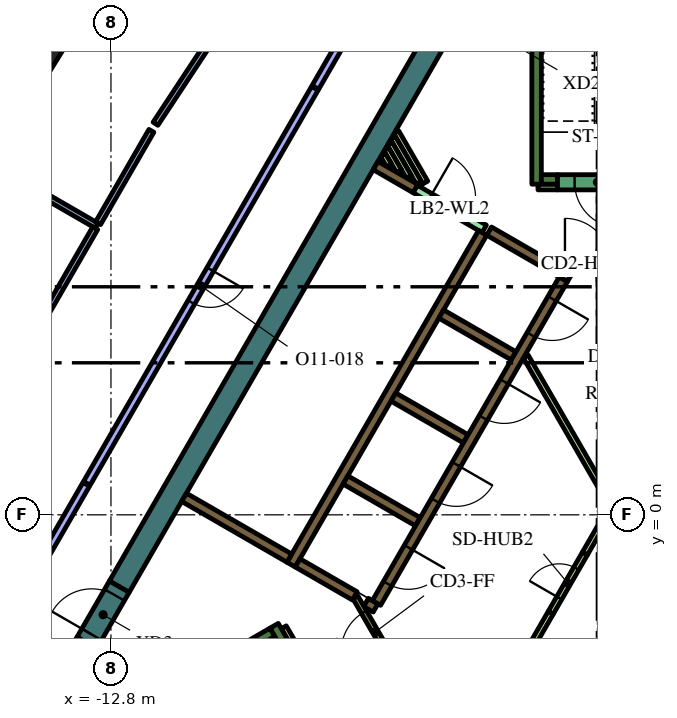
"""IFC4 building model, lengths in metres.
Left out: names, types, materials, properties, quantities, classifications, styles, units other than length and angle.
Written with IfcOpenShell. Run it as: python <this file> out.ifc"""

import sys

from ifc_helpers import new_model, si_unit, direction, frame, frame_2d, origin, origin_2d, place, context, subcontext, project, spatial, polyline, rectangle, outline, extrude, element, fill, save


model = new_model("IFC4")
c1 = context("Model", 3, precision=1e-05, world=origin(), true_north=direction((0.0, 1.0)))
c2 = subcontext(c1, "Body", "Model", "MODEL_VIEW")
j1 = project(units=[si_unit("LENGTHUNIT", "METRE"), si_unit("PLANEANGLEUNIT", "RADIAN")], contexts=[c1])
p1 = place(None, origin())
s1 = spatial("IfcSite", under=j1, at=p1, CompositionType="ELEMENT")
p2 = place(p1, origin())
s2 = spatial("IfcBuilding", under=s1, at=p2, CompositionType="ELEMENT")
p3 = place(p2, frame((0.0, 0.0, 271.2)))
s3 = spatial("IfcBuildingStorey", under=s2, at=p3, CompositionType="ELEMENT", Elevation=271.2)
p4 = place(p3, frame((-14.556, 12.098, 0.0), z_axis=(0.0, 0.0, 1.0), x_axis=(-0.525609744083, -0.850725805959, 0.0)))
e1 = element("IfcColumn", 1, at=p4, inside=s3, PredefinedType="COLUMN", context=c2, shape_type="SweptSolid", body=[
    extrude(rectangle(XDim=1.0, YDim=0.7, at=origin_2d()), origin(), (0.0, 0.0, 1.0), 4.2),
])
p5 = place(p3, frame((-13.432, -3.364, 0.0), z_axis=(0.0, 0.0, 1.0), x_axis=(-0.499960127962, -0.866048422692, 0.0)))
e2 = element("IfcWall", 2, at=p5, inside=s3, PredefinedType="SOLIDWALL", context=c2, shape_type="SweptSolid", body=[
    extrude(rectangle(XDim=2.934, YDim=0.6, at=frame_2d((1.467, 0.0))), origin(), (0.0, 0.0, 1.0), 4.2),
])
p6 = place(p3, frame((-4.234, 12.566, 0.0), z_axis=(0.0, 0.0, 1.0), x_axis=(-0.499998841866, -0.866026072432, 0.0)))
e3 = element("IfcWall", 3, at=p6, inside=s3, PredefinedType="SOLIDWALL", context=c2, shape_type="SweptSolid", body=[
    extrude(rectangle(XDim=16.694, YDim=0.6, at=frame_2d((8.347, 0.0))), origin(), (0.0, 0.0, 1.0), 4.2),
])
p7 = place(p3, frame((-1.6, 8.7, 0.0), z_axis=(0.0, 0.0, 1.0), x_axis=(0.0, 1.0, 0.0)))
e4 = element("IfcWall", 4, at=p7, inside=s3, PredefinedType="SOLIDWALL", context=c2, shape_type="SweptSolid", body=[
    extrude(rectangle(XDim=7.05, YDim=0.25, at=frame_2d((3.525, 0.0))), origin(), (0.0, 0.0, 1.0), 4.2),
])
p8 = place(p3, frame((-1.475, 8.825, 0.0), z_axis=(0.0, 0.0, 1.0), x_axis=(1.0, 0.0, 0.0)))
e5 = element("IfcWall", 5, at=p8, inside=s3, PredefinedType="SOLIDWALL", context=c2, shape_type="SweptSolid", body=[
    extrude(rectangle(XDim=0.425, YDim=0.25, at=frame_2d((0.212, 0.0))), origin(), (0.0, 0.0, 1.0), 4.2),
])
p9 = place(p3, frame((-14.44, -6.49, 0.0), z_axis=(0.0, 0.0, 1.0), x_axis=(0.866022966069, 0.500004222222, 0.0)))
e6 = element("IfcWall", 6, at=p9, inside=s3, PredefinedType="SOLIDWALL", context=c2, shape_type="SweptSolid", body=[
    extrude(rectangle(XDim=6.8, YDim=0.25, at=frame_2d((3.4, 0.0))), origin(), (0.0, 0.0, 1.0), 4.2),
])
p10 = place(p3, frame((-8.168, -3.503, 0.0), z_axis=(0.0, 0.0, 1.0), x_axis=(-0.499952099219, 0.866053057547, 0.0)))
e7 = element("IfcWall", 7, at=p10, inside=s3, PredefinedType="SOLIDWALL", context=c2, shape_type="SweptSolid", body=[
    extrude(rectangle(XDim=0.675, YDim=0.25, at=frame_2d((0.337, 0.0))), origin(), (0.0, 0.0, 1.0), 4.2),
])
p11 = place(p3, frame((-3.02, 7.419, 0.0), z_axis=(0.0, 0.0, 1.0), x_axis=(-0.500022956343, -0.866012149528, 0.0)))
e8 = element("IfcWall", 8, at=p11, inside=s3, PredefinedType="SOLIDWALL", context=c2, shape_type="SweptSolid", body=[
    extrude(rectangle(XDim=10.08, YDim=0.25, at=frame_2d((5.04, 0.0))), origin(), (0.0, 0.0, 1.0), 4.2),
])
p12 = place(p3, origin())
e9 = element("IfcWall", 9, at=p12, inside=s3, PredefinedType="SOLIDWALL", context=c2, shape_type="SweptSolid", body=[
    extrude(outline(polyline([(-2.912, 7.356), (-2.787, 7.573), (-1.232, 6.675), (-1.303, 6.675), (-1.304, 6.675), (-1.304, 6.675), (-1.304, 6.525), (-1.304, 6.525), (-1.303, 6.525), (-0.971, 6.525), (-0.665, 6.348), (-0.79, 6.132), (-1.007, 6.257), (-1.007, 6.257), (-2.912, 7.356)])), origin(), (0.0, 0.0, 1.0), 4.2),
])
for number, where, z_axis, x_axis in (
    (10, (-2.204, 4.182, 0.0), (0.0, 0.0, 1.0), (-0.866, 0.5, 0.0)),
    (11, (-5.369, 3.1, 0.0), (0.0, 0.0, 1.0), (0.866, -0.5, 0.0)),
    (12, (-4.724, -0.182, 0.0), (0.0, 0.0, 1.0), (-0.866, 0.5, 0.0)),
):
    element("IfcWall", number, at=place(p3, frame(where, z_axis=z_axis, x_axis=x_axis)), inside=s3, PredefinedType="SOLIDWALL", context=c2, shape_type="SweptSolid", body=[
        extrude(rectangle(XDim=2.2, YDim=0.25, at=frame_2d((1.1, 0.0))), origin(), (0.0, 0.0, 1.0), 4.2),
    ])
p13 = place(p3, frame((-6.088, -2.305, 0.0), z_axis=(0.0, 0.0, 1.0), x_axis=(0.866059450854, -0.499941024108, 0.0)))
e13 = element("IfcWall", 13, at=p13, inside=s3, PredefinedType="SOLIDWALL", context=c2, shape_type="SweptSolid", body=[
    extrude(rectangle(XDim=0.29, YDim=0.25, at=frame_2d((0.145, 0.0))), origin(), (0.0, 0.0, 1.0), 4.2),
])
p14 = place(p3, frame((-7.889, -1.265, 0.0), z_axis=(0.0, 0.0, 1.0), x_axis=(0.865986741702, -0.500066958712, 0.0)))
e14 = element("IfcWall", 14, at=p14, inside=s3, PredefinedType="SOLIDWALL", context=c2, shape_type="SweptSolid", body=[
    extrude(rectangle(XDim=1.738, YDim=0.25, at=frame_2d((0.869, 0.0))), origin(), (0.0, 0.0, 1.0), 4.2),
])
p15 = place(p3, frame((-8.106, -1.14, 0.0), z_axis=(0.0, 0.0, 1.0), x_axis=(-0.866008981251, 0.500028443584, 0.0)))
e15 = element("IfcWall", 15, at=p15, inside=s3, PredefinedType="SOLIDWALL", context=c2, shape_type="SweptSolid", body=[
    extrude(rectangle(XDim=3.2, YDim=0.25, at=frame_2d((1.6, 0.0))), origin(), (0.0, 0.0, 1.0), 4.2),
])
p16 = place(p3, frame((-5.837, 9.19, 0.0), z_axis=(0.0, 0.0, 1.0), x_axis=(0.866024298998, -0.500001913541, 0.0)))
e16 = element("IfcWall", 16, at=p16, inside=s3, PredefinedType="SOLIDWALL", context=c2, shape_type="SweptSolid", body=[
    extrude(rectangle(XDim=1.21, YDim=0.25, at=frame_2d((0.605, 0.0))), origin(), (0.0, 0.0, 1.0), 4.2),
])
p17 = place(p3, frame((-8.252, -2.958, 0.0), z_axis=(0.0, 0.0, 1.0), x_axis=(0.500174715838, -0.865924508047, 0.0)))
e17 = element("IfcWall", 17, at=p17, inside=s3, PredefinedType="PARTITIONING", context=c2, shape_type="SweptSolid", body=[
    extrude(rectangle(XDim=0.514, YDim=0.15, at=frame_2d((0.257, 0.0))), origin(), (0.0, 0.0, 1.0), 3.55),
])
p18 = place(p3, frame((-5.294, 10.067, 0.0), z_axis=(0.0, 0.0, 1.0), x_axis=(0.500054140411, -0.865994143547, 0.0)))
e18 = element("IfcWall", 18, at=p18, inside=s3, PredefinedType="PARTITIONING", context=c2, shape_type="SweptSolid", body=[
    extrude(rectangle(XDim=1.529, YDim=0.15, at=frame_2d((0.765, 0.0))), origin(), (0.0, 0.0, 1.0), 3.55),
])
p19 = place(p3, frame((-5.381, 9.917, 0.0), z_axis=(0.0, 0.0, 1.0), x_axis=(0.500136970483, -0.865946309396, 0.0)))
e19 = element("IfcWall", 19, at=p19, inside=s3, PredefinedType="PARTITIONING", context=c2, shape_type="SweptSolid", body=[
    extrude(rectangle(XDim=1.359, YDim=0.15, at=frame_2d((0.68, 0.0))), origin(), (0.0, 0.0, 1.0), 3.55),
])
p20 = place(p3, frame((-5.467, 9.767, 0.0), z_axis=(0.0, 0.0, 1.0), x_axis=(0.500168849293, -0.86592789665, 0.0)))
e20 = element("IfcWall", 20, at=p20, inside=s3, PredefinedType="PARTITIONING", context=c2, shape_type="SweptSolid", body=[
    extrude(rectangle(XDim=1.01, YDim=0.15, at=frame_2d((0.505, 0.0))), origin(), (0.0, 0.0, 1.0), 3.55),
])
p21 = place(p3, frame((-5.554, 9.617, 0.0), z_axis=(0.0, 0.0, 1.0), x_axis=(0.500253084543, -0.86587923604, 0.0)))
e21 = element("IfcWall", 21, at=p21, inside=s3, PredefinedType="PARTITIONING", context=c2, shape_type="SweptSolid", body=[
    extrude(rectangle(XDim=0.664, YDim=0.15, at=frame_2d((0.332, 0.0))), origin(), (0.0, 0.0, 1.0), 3.55),
])
p22 = place(p3, frame((-5.64, 9.467, 0.0), z_axis=(0.0, 0.0, 1.0), x_axis=(0.499944387978, -0.86605750902, 0.0)))
e22 = element("IfcWall", 22, at=p22, inside=s3, PredefinedType="PARTITIONING", context=c2, shape_type="SweptSolid", body=[
    extrude(rectangle(XDim=0.317, YDim=0.15, at=frame_2d((0.159, 0.0))), origin(), (0.0, 0.0, 1.0), 3.55),
])
p23 = place(p3, frame((-1.564, 8.625, 0.0), z_axis=(0.0, 0.0, 1.0), x_axis=(1.0, 0.0, 0.0)))
e23 = element("IfcWall", 23, at=p23, inside=s3, PredefinedType="PARTITIONING", context=c2, shape_type="SweptSolid", body=[
    extrude(rectangle(XDim=0.514, YDim=0.15, at=frame_2d((0.257, 0.0))), origin(), (0.0, 0.0, 1.0), 3.55),
])
p24 = place(p3, frame((-1.887, 4.168, 0.0), z_axis=(0.0, 0.0, 1.0), x_axis=(0.499997069472, -0.866027095719, 0.0)))
e24 = element("IfcWall", 24, at=p24, inside=s3, PredefinedType="PARTITIONING", context=c2, shape_type="SweptSolid", body=[
    extrude(rectangle(XDim=9.106, YDim=0.15, at=frame_2d((4.553, 0.0))), origin(), (0.0, 0.0, 1.0), 3.55),
])
for number, where, z_axis, x_axis in (
    (25, (-0.329, -1.021, 0.0), (0.0, 0.0, 1.0), (0.5, 0.866, 0.0)),
    (26, (-1.887, -3.718, 0.0), (0.0, 0.0, 1.0), (0.5, 0.866, 0.0)),
):
    element("IfcWall", number, at=place(p3, frame(where, z_axis=z_axis, x_axis=x_axis)), inside=s3, PredefinedType="PARTITIONING", context=c2, shape_type="SweptSolid", body=[
        extrude(rectangle(XDim=1.315, YDim=0.15, at=frame_2d((0.657, 0.0))), origin(), (0.0, 0.0, 1.0), 3.55),
    ])
p25 = place(p3, frame((-0.898, 6.194, 0.0), z_axis=(0.0, 0.0, 1.0), x_axis=(-0.499996202215, -0.866027596426, 0.0)))
e27 = element("IfcWall", 27, at=p25, inside=s3, PredefinedType="SOLIDWALL", context=c2, shape_type="SweptSolid", body=[
    extrude(rectangle(XDim=9.83, YDim=0.25, at=frame_2d((4.915, 0.0))), origin(), (0.0, 0.0, 1.0), 4.2),
])
p26 = place(p25, frame((0.585, 0.0, 0.0)))
e28 = element("IfcOpeningElement", 28, at=p26, cuts=e27, PredefinedType="OPENING", context=c2, shape_type="SweptSolid", body=[
    extrude(rectangle(XDim=1.1, YDim=2.1, at=frame_2d((0.55, 1.05))), frame((0.0, 0.135, 0.0), z_axis=(0.0, -1.0, 0.0), x_axis=(1.0, 0.0, 0.0)), (0.0, 0.0, 1.0), 0.27),
])
p27 = place(p25, frame((3.105, 0.0, 0.0)))
e29 = element("IfcOpeningElement", 29, at=p27, cuts=e27, PredefinedType="OPENING", context=c2, shape_type="SweptSolid", body=[
    extrude(rectangle(XDim=1.1, YDim=2.1, at=frame_2d((0.55, 1.05))), frame((0.0, 0.135, 0.0), z_axis=(0.0, -1.0, 0.0), x_axis=(1.0, 0.0, 0.0)), (0.0, 0.0, 1.0), 0.27),
])
p28 = place(p25, frame((5.625, 0.0, 0.0)))
e30 = element("IfcOpeningElement", 30, at=p28, cuts=e27, PredefinedType="OPENING", context=c2, shape_type="SweptSolid", body=[
    extrude(rectangle(XDim=1.1, YDim=2.1, at=frame_2d((0.55, 1.05))), frame((0.0, 0.135, 0.0), z_axis=(0.0, -1.0, 0.0), x_axis=(1.0, 0.0, 0.0)), (0.0, 0.0, 1.0), 0.27),
])
p29 = place(p25, frame((8.145, 0.0, 0.0)))
e31 = element("IfcOpeningElement", 31, at=p29, cuts=e27, PredefinedType="OPENING", context=c2, shape_type="SweptSolid", body=[
    extrude(rectangle(XDim=1.1, YDim=2.1, at=frame_2d((0.55, 1.05))), frame((0.0, 0.135, 0.0), z_axis=(0.0, -1.0, 0.0), x_axis=(1.0, 0.0, 0.0)), (0.0, 0.0, 1.0), 0.27),
])
p30 = place(p3, frame((1.05, 8.75, 0.0), z_axis=(0.0, 0.0, 1.0), x_axis=(-1.0, 0.0, 0.0)))
e32 = element("IfcWall", 32, at=p30, inside=s3, PredefinedType="SOLIDWALL", context=c2, shape_type="SweptSolid", body=[
    extrude(rectangle(XDim=2.1, YDim=0.4, at=frame_2d((1.05, 0.0))), origin(), (0.0, 0.0, 1.0), 4.2),
])
p31 = place(p30, frame((0.45, 0.0, 0.0)))
e33 = element("IfcOpeningElement", 33, at=p31, cuts=e32, PredefinedType="OPENING", context=c2, shape_type="SweptSolid", body=[
    extrude(rectangle(XDim=1.2, YDim=2.1, at=frame_2d((0.6, 1.05))), frame((0.0, 0.21, 0.0), z_axis=(0.0, -1.0, 0.0), x_axis=(1.0, 0.0, 0.0)), (0.0, 0.0, 1.0), 0.42),
])
p32 = place(p3, frame((-1.303, 6.6, 0.0), z_axis=(0.0, 0.0, 1.0), x_axis=(1.0, 0.0, 0.0)))
e34 = element("IfcWall", 34, at=p32, inside=s3, PredefinedType="PARTITIONING", context=c2, shape_type="SweptSolid", body=[
    extrude(rectangle(XDim=2.1, YDim=0.15, at=frame_2d((1.05, 0.0))), origin(), (0.0, 0.0, 1.0), 4.2),
])
p33 = place(p32, frame((0.45, 0.0, 0.0)))
e35 = element("IfcOpeningElement", 35, at=p33, cuts=e34, PredefinedType="OPENING", context=c2, shape_type="SweptSolid", body=[
    extrude(rectangle(XDim=1.2, YDim=2.1, at=frame_2d((0.6, 1.05))), frame((0.0, 0.085, 0.0), z_axis=(0.0, -1.0, 0.0), x_axis=(1.0, 0.0, 0.0)), (0.0, 0.0, 1.0), 0.17),
])
p34 = place(p3, frame((-5.317, -3.99, 0.0), z_axis=(0.0, 0.0, 1.0), x_axis=(-0.500027713859, 0.866009402589, 0.0)))
e36 = element("IfcWall", 36, at=p34, inside=s3, PredefinedType="PARTITIONING", context=c2, shape_type="SweptSolid", body=[
    extrude(rectangle(XDim=2.1, YDim=0.15, at=frame_2d((1.05, 0.0))), origin(), (0.0, 0.0, 1.0), 4.2),
])
p35 = place(p34, frame((0.45, 0.0, 0.0)))
e37 = element("IfcOpeningElement", 37, at=p35, cuts=e36, PredefinedType="OPENING", context=c2, shape_type="SweptSolid", body=[
    extrude(rectangle(XDim=1.2, YDim=2.1, at=frame_2d((0.6, 1.05))), frame((0.0, 0.085, 0.0), z_axis=(0.0, -1.0, 0.0), x_axis=(1.0, 0.0, 0.0)), (0.0, 0.0, 1.0), 0.17),
])
p36 = place(p3, frame((-4.796, 8.575, 0.0), z_axis=(0.0, 0.0, 1.0), x_axis=(0.866009402589, -0.500027713859, 0.0)))
e38 = element("IfcWall", 38, at=p36, inside=s3, PredefinedType="PARTITIONING", context=c2, shape_type="SweptSolid", body=[
    extrude(rectangle(XDim=2.1, YDim=0.226, at=frame_2d((1.05, 0.0))), origin(), (0.0, 0.0, 1.0), 3.55),
])
p37 = place(p36, frame((0.45, 0.0, 0.0)))
e39 = element("IfcOpeningElement", 39, at=p37, cuts=e38, PredefinedType="OPENING", context=c2, shape_type="SweptSolid", body=[
    extrude(rectangle(XDim=1.2, YDim=2.1, at=frame_2d((0.6, 1.05))), frame((0.0, 0.123, 0.0), z_axis=(0.0, -1.0, 0.0), x_axis=(1.0, 0.0, 0.0)), (0.0, 0.0, 1.0), 0.246),
])
p38 = place(p3, frame((-13.432, -3.364, 0.0), z_axis=(0.0, 0.0, 1.0), x_axis=(0.500000056704, 0.866025371046, 0.0)))
e40 = element("IfcWall", 40, at=p38, inside=s3, PredefinedType="SOLIDWALL", context=c2, shape_type="SweptSolid", body=[
    extrude(rectangle(XDim=1.7, YDim=0.6, at=frame_2d((0.85, 0.0))), origin(), (0.0, 0.0, 1.0), 4.2),
])
p39 = place(p38, frame((0.25, 0.0, 0.0)))
e41 = element("IfcOpeningElement", 41, at=p39, cuts=e40, PredefinedType="OPENING", context=c2, shape_type="SweptSolid", body=[
    extrude(rectangle(XDim=1.2, YDim=2.1, at=frame_2d((0.6, 1.05))), frame((0.0, 0.31, 0.0), z_axis=(0.0, -1.0, 0.0), x_axis=(1.0, 0.0, 0.0)), (0.0, 0.0, 1.0), 0.62),
])
p40 = place(p3, frame((-1.229, -2.579, 0.0), z_axis=(0.0, 0.0, 1.0), x_axis=(0.500062916607, 0.865989075817, 0.0)))
e42 = element("IfcWall", 42, at=p40, inside=s3, PredefinedType="PARTITIONING", context=c2, shape_type="SweptSolid", body=[
    extrude(rectangle(XDim=1.8, YDim=0.15, at=frame_2d((0.9, 0.0))), origin(), (0.0, 0.0, 1.0), 3.55),
])
p41 = place(p40, frame((0.45, 0.0, 0.0)))
e43 = element("IfcOpeningElement", 43, at=p41, cuts=e42, PredefinedType="OPENING", context=c2, shape_type="SweptSolid", body=[
    extrude(rectangle(XDim=0.9, YDim=2.1, at=frame_2d((0.45, 1.05))), frame((0.0, 0.085, 0.0), z_axis=(0.0, -1.0, 0.0), x_axis=(1.0, 0.0, 0.0)), (0.0, 0.0, 1.0), 0.17),
])
p42 = place(p3, frame((-13.177, 7.608, 0.0), z_axis=(0.0, 0.0, 1.0), x_axis=(-0.866018442252, 0.500012057535, 0.0)))
e44 = element("IfcWall", 44, at=p42, inside=s3, PredefinedType="PARTITIONING", context=c2, shape_type="SweptSolid", body=[
    extrude(rectangle(XDim=3.6, YDim=0.15, at=frame_2d((1.8, 0.0))), origin(), (0.0, 0.0, 1.0), 3.55),
])
p43 = place(p3, frame((-11.628, 10.29, 0.0), z_axis=(0.0, 0.0, 1.0), x_axis=(0.55074607557, 0.834672846236, 0.0)))
e45 = element("IfcWall", 45, at=p43, inside=s3, PredefinedType="PARTITIONING", context=c2, shape_type="SweptSolid", body=[
    extrude(rectangle(XDim=5.979, YDim=0.15, at=frame_2d((2.99, 0.0))), origin(), (0.0, 0.0, 1.0), 3.55),
])
p44 = place(p43, frame((2.58, 0.0, 0.0)))
e46 = element("IfcOpeningElement", 46, at=p44, cuts=e45, PredefinedType="OPENING", context=c2, shape_type="SweptSolid", body=[
    extrude(rectangle(XDim=0.9, YDim=2.1, at=frame_2d((0.45, 1.05))), frame((0.0, 0.085, 0.0), z_axis=(0.0, -1.0, 0.0), x_axis=(1.0, 0.0, 0.0)), (0.0, 0.0, 1.0), 0.17),
])
p45 = place(p3, frame((-11.736, 10.104, 0.0), z_axis=(0.0, 0.0, 1.0), x_axis=(-0.500011000363, -0.866019052629, 0.0)))
e47 = element("IfcWall", 47, at=p45, inside=s3, PredefinedType="PARTITIONING", context=c2, shape_type="SweptSolid", body=[
    extrude(rectangle(XDim=2.808, YDim=0.15, at=frame_2d((1.404, 0.0))), origin(), (0.0, 0.0, 1.0), 3.55),
])
p46 = place(p3, frame((-13.214, 7.543, 0.0), z_axis=(0.0, 0.0, 1.0), x_axis=(-0.499927597274, -0.866067201483, 0.0)))
e48 = element("IfcWall", 48, at=p46, inside=s3, PredefinedType="PARTITIONING", context=c2, shape_type="SweptSolid", body=[
    extrude(rectangle(XDim=3.022, YDim=0.15, at=frame_2d((1.511, 0.0))), origin(), (0.0, 0.0, 1.0), 3.55),
])
p47 = place(p3, frame((-7.436, 11.221, 0.0), z_axis=(0.0, 0.0, 1.0), x_axis=(-0.49999894854, -0.866026010844, 0.0)))
e49 = element("IfcWall", 49, at=p47, inside=s3, PredefinedType="PARTITIONING", context=c2, shape_type="SweptSolid", body=[
    extrude(rectangle(XDim=12.0, YDim=0.2, at=frame_2d((6.0, 0.0))), origin(), (0.0, 0.0, 1.0), 3.55),
])
p48 = place(p47, frame((5.5, 0.0, 0.0)))
e50 = element("IfcOpeningElement", 50, at=p48, cuts=e49, PredefinedType="OPENING", context=c2, shape_type="SweptSolid", body=[
    extrude(rectangle(XDim=1.0, YDim=2.1, at=frame_2d((0.5, 1.05))), frame((0.0, 0.11, 0.0), z_axis=(0.0, -1.0, 0.0), x_axis=(1.0, 0.0, 0.0)), (0.0, 0.0, 1.0), 0.22),
])
p49 = place(p3, frame((-13.451, 0.803, 0.0), z_axis=(0.0, 0.0, 1.0), x_axis=(-0.499982585408, -0.86603545787, 0.0)))
e51 = element("IfcWall", 51, at=p49, inside=s3, PredefinedType="PARTITIONING", context=c2, shape_type="SweptSolid", body=[
    extrude(rectangle(XDim=8.26, YDim=0.2, at=frame_2d((4.13, 0.0))), origin(), (0.0, 0.0, 1.0), 3.55),
])
p50 = place(p3, frame((-3.306, 18.374, 0.0), z_axis=(0.0, 0.0, 1.0), x_axis=(-0.499999798456, -0.866025520146, 0.0)))
e52 = element("IfcWall", 52, at=p50, inside=s3, PredefinedType="PARTITIONING", context=c2, shape_type="SweptSolid", body=[
    extrude(rectangle(XDim=8.229, YDim=0.2, at=frame_2d((4.115, 0.0))), origin(), (0.0, 0.0, 1.0), 3.55),
])
p51 = place(p26, origin())
e53 = element("IfcDoor", 53, at=p51, inside=s3, OperationType="DOUBLE_DOOR_SLIDING", PredefinedType="DOOR", context=c2, shape_type="SweptSolid", body=[
    extrude(rectangle(XDim=1.1, YDim=2.1, at=frame_2d((0.55, 1.05))), frame((0.0, 0.025, 0.0), z_axis=(0.0, -1.0, 0.0), x_axis=(1.0, 0.0, 0.0)), (0.0, 0.0, 1.0), 0.05),
])
fill(e28, e53)
p52 = place(p27, origin())
e54 = element("IfcDoor", 54, at=p52, inside=s3, OperationType="DOUBLE_DOOR_SLIDING", PredefinedType="DOOR", context=c2, shape_type="SweptSolid", body=[
    extrude(rectangle(XDim=1.1, YDim=2.1, at=frame_2d((0.55, 1.05))), frame((0.0, 0.025, 0.0), z_axis=(0.0, -1.0, 0.0), x_axis=(1.0, 0.0, 0.0)), (0.0, 0.0, 1.0), 0.05),
])
fill(e29, e54)
p53 = place(p28, origin())
e55 = element("IfcDoor", 55, at=p53, inside=s3, OperationType="DOUBLE_DOOR_SLIDING", PredefinedType="DOOR", context=c2, shape_type="SweptSolid", body=[
    extrude(rectangle(XDim=1.1, YDim=2.1, at=frame_2d((0.55, 1.05))), frame((0.0, 0.025, 0.0), z_axis=(0.0, -1.0, 0.0), x_axis=(1.0, 0.0, 0.0)), (0.0, 0.0, 1.0), 0.05),
])
fill(e30, e55)
p54 = place(p29, origin())
e56 = element("IfcDoor", 56, at=p54, inside=s3, OperationType="DOUBLE_DOOR_SLIDING", PredefinedType="DOOR", context=c2, shape_type="SweptSolid", body=[
    extrude(rectangle(XDim=1.1, YDim=2.1, at=frame_2d((0.55, 1.05))), frame((0.0, 0.025, 0.0), z_axis=(0.0, -1.0, 0.0), x_axis=(1.0, 0.0, 0.0)), (0.0, 0.0, 1.0), 0.05),
])
fill(e31, e56)
p55 = place(p31, origin())
e57 = element("IfcDoor", 57, at=p55, inside=s3, OperationType="SINGLE_SWING_LEFT", PredefinedType="DOOR", context=c2, shape_type="SweptSolid", body=[
    extrude(rectangle(XDim=1.2, YDim=2.1, at=frame_2d((0.6, 1.05))), frame((0.0, 0.025, 0.0), z_axis=(0.0, -1.0, 0.0), x_axis=(1.0, 0.0, 0.0)), (0.0, 0.0, 1.0), 0.05),
])
fill(e33, e57)
p56 = place(p33, origin())
e58 = element("IfcDoor", 58, at=p56, inside=s3, OperationType="SINGLE_SWING_LEFT", PredefinedType="DOOR", context=c2, shape_type="SweptSolid", body=[
    extrude(rectangle(XDim=1.2, YDim=2.1, at=frame_2d((0.6, 1.05))), frame((0.0, 0.025, 0.0), z_axis=(0.0, -1.0, 0.0), x_axis=(1.0, 0.0, 0.0)), (0.0, 0.0, 1.0), 0.05),
])
fill(e35, e58)
p57 = place(p35, origin())
e59 = element("IfcDoor", 59, at=p57, inside=s3, OperationType="SINGLE_SWING_LEFT", PredefinedType="DOOR", context=c2, shape_type="SweptSolid", body=[
    extrude(rectangle(XDim=1.2, YDim=2.1, at=frame_2d((0.6, 1.05))), frame((0.0, 0.025, 0.0), z_axis=(0.0, -1.0, 0.0), x_axis=(1.0, 0.0, 0.0)), (0.0, 0.0, 1.0), 0.05),
])
fill(e37, e59)
p58 = place(p37, origin())
e60 = element("IfcDoor", 60, at=p58, inside=s3, OperationType="SINGLE_SWING_LEFT", PredefinedType="DOOR", context=c2, shape_type="SweptSolid", body=[
    extrude(rectangle(XDim=1.2, YDim=2.1, at=frame_2d((0.6, 1.05))), frame((0.0, 0.025, 0.0), z_axis=(0.0, -1.0, 0.0), x_axis=(1.0, 0.0, 0.0)), (0.0, 0.0, 1.0), 0.05),
])
fill(e39, e60)
p59 = place(p39, origin())
e61 = element("IfcDoor", 61, at=p59, inside=s3, OperationType="SINGLE_SWING_LEFT", PredefinedType="DOOR", context=c2, shape_type="SweptSolid", body=[
    extrude(rectangle(XDim=1.2, YDim=2.1, at=frame_2d((0.6, 1.05))), frame((0.0, 0.025, 0.0), z_axis=(0.0, -1.0, 0.0), x_axis=(1.0, 0.0, 0.0)), (0.0, 0.0, 1.0), 0.05),
])
fill(e41, e61)
p60 = place(p41, origin())
e62 = element("IfcDoor", 62, at=p60, inside=s3, OperationType="SINGLE_SWING_LEFT", PredefinedType="DOOR", context=c2, shape_type="SweptSolid", body=[
    extrude(rectangle(XDim=0.9, YDim=2.1, at=frame_2d((0.45, 1.05))), frame((0.0, 0.025, 0.0), z_axis=(0.0, -1.0, 0.0), x_axis=(1.0, 0.0, 0.0)), (0.0, 0.0, 1.0), 0.05),
])
fill(e43, e62)
p61 = place(p48, origin())
e63 = element("IfcDoor", 63, at=p61, inside=s3, OperationType="SINGLE_SWING_RIGHT", PredefinedType="DOOR", context=c2, shape_type="SweptSolid", body=[
    extrude(rectangle(XDim=1.0, YDim=2.1, at=frame_2d((0.5, 1.05))), frame((0.0, 0.025, 0.0), z_axis=(0.0, -1.0, 0.0), x_axis=(1.0, 0.0, 0.0)), (0.0, 0.0, 1.0), 0.05),
])
fill(e50, e63)
save(model, sys.argv[1])
